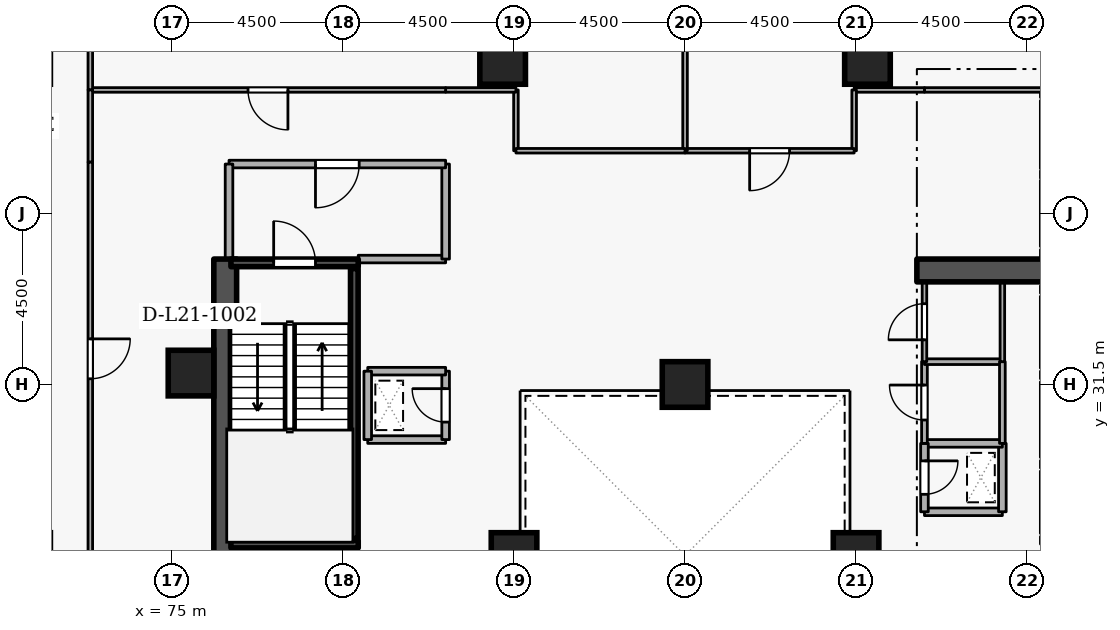
"""IFC4 building model, lengths in metres.
Left out: names, types, materials, properties, quantities, classifications, styles, units other than length and angle.
Written with IfcOpenShell. Run it as: python <this file> out.ifc"""

import sys

from ifc_helpers import new_model, si_unit, direction, frame, frame_2d, origin, origin_2d, place, context, subcontext, project, spatial, rectangle, extrude, element, fill, save


model = new_model("IFC4")
c1 = context("Model", 3, precision=1e-05, world=origin(), true_north=direction((0.0, 1.0)))
c2 = subcontext(c1, "Body", "Model", "MODEL_VIEW")
j1 = project(units=[si_unit("LENGTHUNIT", "METRE"), si_unit("PLANEANGLEUNIT", "RADIAN")], contexts=[c1])
p1 = place(None, origin())
s1 = spatial("IfcSite", under=j1, at=p1, CompositionType="ELEMENT")
p2 = place(p1, origin())
s2 = spatial("IfcBuilding", under=s1, at=p2, CompositionType="ELEMENT")
p3 = place(p2, frame((0.0, 0.0, 83.7)))
s3 = spatial("IfcBuildingStorey", under=s2, at=p3, CompositionType="ELEMENT", Elevation=83.7)
p4 = place(p3, frame((94.6, 34.5, 0.0), z_axis=(0.0, 0.0, 1.0), x_axis=(1.0, 0.0, 0.0)))
e1 = element("IfcWall", 1, at=p4, inside=s3, PredefinedType="SHEAR", context=c2, shape_type="SweptSolid", body=[
    extrude(rectangle(XDim=5.7, YDim=0.6, at=frame_2d((2.85, 0.0))), origin(), (0.0, 0.0, 1.0), 3.6),
])
p5 = place(p3, frame((76.4, 19.2, 0.0), z_axis=(0.0, 0.0, 1.0), x_axis=(0.0, 1.0, 0.0)))
e2 = element("IfcWall", 2, at=p5, inside=s3, PredefinedType="SHEAR", context=c2, shape_type="SweptSolid", body=[
    extrude(rectangle(XDim=15.6, YDim=0.6, at=frame_2d((7.8, 0.0))), origin(), (0.0, 0.0, 1.0), 3.6),
])
for number, where, z_axis, x_axis in (
    (3, (93.3, 40.0, 0.0), (0.0, 0.0, 1.0), (1.0, 0.0, 0.0)),
    (4, (83.7, 40.0, 0.0), (0.0, 0.0, 1.0), (1.0, 0.0, 0.0)),
    (5, (75.5, 31.8, 0.0), (0.0, 0.0, 1.0), (1.0, 0.0, 0.0)),
    (6, (93.0, 27.0, 0.0), (0.0, 0.0, 1.0), (1.0, 0.0, 0.0)),
    (7, (84.0, 27.0, 0.0), (0.0, 0.0, 1.0), (1.0, 0.0, 0.0)),
    (8, (88.5, 31.5, 0.0), (0.0, 0.0, 1.0), (1.0, 0.0, 0.0)),
):
    element("IfcColumn", number, at=place(p3, frame(where, z_axis=z_axis, x_axis=x_axis)), inside=s3, PredefinedType="COLUMN", context=c2, shape_type="SweptSolid", body=[
        extrude(rectangle(XDim=1.2, YDim=1.2, at=origin_2d()), origin(), (0.0, 0.0, 1.0), 3.6),
    ])
p6 = place(p3, frame((97.95, 29.22, 0.0), z_axis=(0.0, 0.0, 1.0), x_axis=(0.0, -1.0, 0.0)))
e9 = element("IfcWall", 9, at=p6, inside=s3, PredefinedType="STANDARD", context=c2, shape_type="SweptSolid", body=[
    extrude(rectangle(XDim=1.64, YDim=0.2, at=frame_2d((0.82, 0.0))), origin(), (0.0, 0.0, 1.0), 3.34),
])
p7 = place(p6, frame((0.31, 0.0, 0.0)))
e10 = element("IfcOpeningElement", 10, at=p7, cuts=e9, PredefinedType="OPENING", context=c2, shape_type="SweptSolid", body=[
    extrude(rectangle(XDim=1.02, YDim=2.06, at=frame_2d((0.51, 1.03))), frame((0.0, 0.11, 0.0), z_axis=(0.0, -1.0, 0.0), x_axis=(1.0, 0.0, 0.0)), (0.0, 0.0, 1.0), 0.22),
])
p8 = place(p3, frame((97.95, 31.57, 0.0), z_axis=(0.0, 0.0, 1.0), x_axis=(0.0, -1.0, 0.0)))
e11 = element("IfcWall", 11, at=p8, inside=s3, PredefinedType="STANDARD", context=c2, shape_type="SweptSolid", body=[
    extrude(rectangle(XDim=1.99, YDim=0.2, at=frame_2d((0.995, 0.0))), origin(), (0.0, 0.0, 1.0), 3.34),
])
p9 = place(p3, frame((97.95, 33.82, 0.0), z_axis=(0.0, 0.0, 1.0), x_axis=(0.0, -1.0, 0.0)))
e12 = element("IfcWall", 12, at=p9, inside=s3, PredefinedType="STANDARD", context=c2, shape_type="SweptSolid", body=[
    extrude(rectangle(XDim=1.89, YDim=0.2, at=frame_2d((0.945, 0.0))), origin(), (0.0, 0.0, 1.0), 3.34),
])
p10 = place(p9, frame((0.435, 0.0, 0.0)))
e13 = element("IfcOpeningElement", 13, at=p10, cuts=e12, PredefinedType="OPENING", context=c2, shape_type="SweptSolid", body=[
    extrude(rectangle(XDim=1.02, YDim=2.06, at=frame_2d((0.51, 1.03))), frame((0.0, 0.11, 0.0), z_axis=(0.0, -1.0, 0.0), x_axis=(1.0, 0.0, 0.0)), (0.0, 0.0, 1.0), 0.22),
])
p11 = place(p3, frame((97.95, 36.87, 0.0), z_axis=(0.0, 0.0, 1.0), x_axis=(0.0, -1.0, 0.0)))
e14 = element("IfcWall", 14, at=p11, inside=s3, PredefinedType="STANDARD", context=c2, shape_type="SweptSolid", body=[
    extrude(rectangle(XDim=1.74, YDim=0.2, at=frame_2d((0.87, 0.0))), origin(), (0.0, 0.0, 1.0), 3.34),
])
p12 = place(p11, frame((0.36, 0.0, 0.0)))
e15 = element("IfcOpeningElement", 15, at=p12, cuts=e14, PredefinedType="OPENING", context=c2, shape_type="SweptSolid", body=[
    extrude(rectangle(XDim=1.02, YDim=2.06, at=frame_2d((0.51, 1.03))), frame((0.0, 0.11, 0.0), z_axis=(0.0, -1.0, 0.0), x_axis=(1.0, 0.0, 0.0)), (0.0, 0.0, 1.0), 0.22),
])
p13 = place(p3, frame((97.95, 38.97, 0.0), z_axis=(0.0, 0.0, 1.0), x_axis=(0.0, -1.0, 0.0)))
e16 = element("IfcWall", 16, at=p13, inside=s3, PredefinedType="STANDARD", context=c2, shape_type="SweptSolid", body=[
    extrude(rectangle(XDim=1.79, YDim=0.2, at=frame_2d((0.895, 0.0))), origin(), (0.0, 0.0, 1.0), 3.34),
])
p14 = place(p13, frame((0.385, 0.0, 0.0)))
e17 = element("IfcOpeningElement", 17, at=p14, cuts=e16, PredefinedType="OPENING", context=c2, shape_type="SweptSolid", body=[
    extrude(rectangle(XDim=1.02, YDim=2.06, at=frame_2d((0.51, 1.03))), frame((0.0, 0.11, 0.0), z_axis=(0.0, -1.0, 0.0), x_axis=(1.0, 0.0, 0.0)), (0.0, 0.0, 1.0), 0.22),
])
p15 = place(p3, frame((76.55, 34.7, 0.0), z_axis=(0.0, 0.0, 1.0), x_axis=(1.0, 0.0, 0.0)))
e18 = element("IfcWall", 18, at=p15, inside=s3, PredefinedType="SHEAR", context=c2, shape_type="SweptSolid", body=[
    extrude(rectangle(XDim=3.35, YDim=0.2, at=frame_2d((1.675, 0.0))), origin(), (0.0, 0.0, 1.0), 3.6),
])
p16 = place(p15, frame((1.125, 0.0, 0.0)))
e19 = element("IfcOpeningElement", 19, at=p16, cuts=e18, PredefinedType="OPENING", context=c2, shape_type="SweptSolid", body=[
    extrude(rectangle(XDim=1.1, YDim=2.1, at=frame_2d((0.55, 1.05))), frame((0.0, 0.11, 0.0), z_axis=(0.0, -1.0, 0.0), x_axis=(1.0, 0.0, 0.0)), (0.0, 0.0, 1.0), 0.22),
])
p17 = place(p3, frame((79.9, 27.3, 0.0), z_axis=(0.0, 0.0, 1.0), x_axis=(-1.0, 0.0, 0.0)))
e20 = element("IfcWall", 20, at=p17, inside=s3, PredefinedType="SHEAR", context=c2, shape_type="SweptSolid", body=[
    extrude(rectangle(XDim=3.35, YDim=0.2, at=frame_2d((1.675, 0.0))), origin(), (0.0, 0.0, 1.0), 3.6),
])
p18 = place(p3, frame((79.797, 27.45, 0.0), z_axis=(0.0, 0.0, 1.0), x_axis=(0.0, 1.0, 0.0)))
e21 = element("IfcWall", 21, at=p18, inside=s3, PredefinedType="SHEAR", context=c2, shape_type="SweptSolid", body=[
    extrude(rectangle(XDim=7.1, YDim=0.2, at=frame_2d((3.55, 0.0))), origin(), (0.0, 0.0, 1.0), 3.6),
])
p19 = place(p3, frame((79.9, 34.8, 0.0), z_axis=(0.0, 0.0, 1.0), x_axis=(1.0, 0.0, 0.0)))
e22 = element("IfcWall", 22, at=p19, inside=s3, PredefinedType="STANDARD", context=c2, shape_type="SweptSolid", body=[
    extrude(rectangle(XDim=2.3, YDim=0.2, at=frame_2d((1.15, 0.0))), origin(), (0.0, 0.0, 1.0), 2.545),
])
p20 = place(p3, frame((82.2, 34.8, 0.0), z_axis=(0.0, 0.0, 1.0), x_axis=(0.0, 1.0, 0.0)))
e23 = element("IfcWall", 23, at=p20, inside=s3, PredefinedType="STANDARD", context=c2, shape_type="SweptSolid", body=[
    extrude(rectangle(XDim=2.5, YDim=0.2, at=frame_2d((1.25, 0.0))), origin(), (0.0, 0.0, 1.0), 3.34),
])
p21 = place(p3, frame((82.2, 37.3, 0.0), z_axis=(0.0, 0.0, 1.0), x_axis=(-1.0, 0.0, 0.0)))
e24 = element("IfcWall", 24, at=p21, inside=s3, PredefinedType="STANDARD", context=c2, shape_type="SweptSolid", body=[
    extrude(rectangle(XDim=5.7, YDim=0.2, at=frame_2d((2.85, 0.0))), origin(), (0.0, 0.0, 1.0), 3.34),
])
p22 = place(p21, frame((2.275, 0.0, 0.0)))
e25 = element("IfcOpeningElement", 25, at=p22, cuts=e24, PredefinedType="OPENING", context=c2, shape_type="SweptSolid", body=[
    extrude(rectangle(XDim=1.15, YDim=2.1, at=frame_2d((0.575, 1.05))), frame((0.0, 0.11, 0.0), z_axis=(0.0, -1.0, 0.0), x_axis=(1.0, 0.0, 0.0)), (0.0, 0.0, 1.0), 0.22),
])
p23 = place(p3, frame((76.5, 37.3, 0.0), z_axis=(0.0, 0.0, 1.0), x_axis=(0.0, -1.0, 0.0)))
e26 = element("IfcWall", 26, at=p23, inside=s3, PredefinedType="STANDARD", context=c2, shape_type="SweptSolid", body=[
    extrude(rectangle(XDim=2.5, YDim=0.2, at=frame_2d((1.25, 0.0))), origin(), (0.0, 0.0, 1.0), 3.34),
])
p24 = place(p3, frame((94.8, 28.15, 0.0), z_axis=(0.0, 0.0, 1.0), x_axis=(1.0, 0.0, 0.0)))
e27 = element("IfcWall", 27, at=p24, inside=s3, PredefinedType="STANDARD", context=c2, shape_type="SweptSolid", body=[
    extrude(rectangle(XDim=2.05, YDim=0.2, at=frame_2d((1.025, 0.0))), origin(), (0.0, 0.0, 1.0), 3.34),
])
p25 = place(p3, frame((96.85, 28.15, 0.0), z_axis=(0.0, 0.0, 1.0), x_axis=(0.0, 1.0, 0.0)))
e28 = element("IfcWall", 28, at=p25, inside=s3, PredefinedType="STANDARD", context=c2, shape_type="SweptSolid", body=[
    extrude(rectangle(XDim=1.8, YDim=0.2, at=frame_2d((0.9, 0.0))), origin(), (0.0, 0.0, 1.0), 3.34),
])
p26 = place(p3, frame((96.85, 29.95, 0.0), z_axis=(0.0, 0.0, 1.0), x_axis=(-1.0, 0.0, 0.0)))
e29 = element("IfcWall", 29, at=p26, inside=s3, PredefinedType="STANDARD", context=c2, shape_type="SweptSolid", body=[
    extrude(rectangle(XDim=2.05, YDim=0.2, at=frame_2d((1.025, 0.0))), origin(), (0.0, 0.0, 1.0), 3.34),
])
p27 = place(p3, frame((94.8, 29.95, 0.0), z_axis=(0.0, 0.0, 1.0), x_axis=(0.0, -1.0, 0.0)))
e30 = element("IfcWall", 30, at=p27, inside=s3, PredefinedType="STANDARD", context=c2, shape_type="SweptSolid", body=[
    extrude(rectangle(XDim=1.8, YDim=0.2, at=frame_2d((0.9, 0.0))), origin(), (0.0, 0.0, 1.0), 3.34),
])
p28 = place(p27, frame((0.46, 0.0, 0.0)))
e31 = element("IfcOpeningElement", 31, at=p28, cuts=e30, PredefinedType="OPENING", context=c2, shape_type="SweptSolid", body=[
    extrude(rectangle(XDim=0.88, YDim=2.04, at=frame_2d((0.44, 1.02))), frame((0.0, 0.11, 0.0), z_axis=(0.0, -1.0, 0.0), x_axis=(1.0, 0.0, 0.0)), (0.0, 0.0, 1.0), 0.22),
])
p29 = place(p3, frame((80.15, 30.05, 0.0), z_axis=(0.0, 0.0, 1.0), x_axis=(1.0, 0.0, 0.0)))
e32 = element("IfcWall", 32, at=p29, inside=s3, PredefinedType="STANDARD", context=c2, shape_type="SweptSolid", body=[
    extrude(rectangle(XDim=2.05, YDim=0.2, at=frame_2d((1.025, 0.0))), origin(), (0.0, 0.0, 1.0), 3.34),
])
p30 = place(p3, frame((82.2, 30.05, 0.0), z_axis=(0.0, 0.0, 1.0), x_axis=(0.0, 1.0, 0.0)))
e33 = element("IfcWall", 33, at=p30, inside=s3, PredefinedType="STANDARD", context=c2, shape_type="SweptSolid", body=[
    extrude(rectangle(XDim=1.8, YDim=0.2, at=frame_2d((0.9, 0.0))), origin(), (0.0, 0.0, 1.0), 3.34),
])
p31 = place(p30, frame((0.46, 0.0, 0.0)))
e34 = element("IfcOpeningElement", 34, at=p31, cuts=e33, PredefinedType="OPENING", context=c2, shape_type="SweptSolid", body=[
    extrude(rectangle(XDim=0.88, YDim=2.04, at=frame_2d((0.44, 1.02))), frame((0.0, 0.11, 0.0), z_axis=(0.0, -1.0, 0.0), x_axis=(1.0, 0.0, 0.0)), (0.0, 0.0, 1.0), 0.22),
])
p32 = place(p3, frame((82.2, 31.85, 0.0), z_axis=(0.0, 0.0, 1.0), x_axis=(-1.0, 0.0, 0.0)))
e35 = element("IfcWall", 35, at=p32, inside=s3, PredefinedType="STANDARD", context=c2, shape_type="SweptSolid", body=[
    extrude(rectangle(XDim=2.05, YDim=0.2, at=frame_2d((1.025, 0.0))), origin(), (0.0, 0.0, 1.0), 3.34),
])
p33 = place(p3, frame((80.15, 31.85, 0.0), z_axis=(0.0, 0.0, 1.0), x_axis=(0.0, -1.0, 0.0)))
e36 = element("IfcWall", 36, at=p33, inside=s3, PredefinedType="STANDARD", context=c2, shape_type="SweptSolid", body=[
    extrude(rectangle(XDim=1.8, YDim=0.2, at=frame_2d((0.9, 0.0))), origin(), (0.0, 0.0, 1.0), 3.34),
])
p34 = place(p3, frame((94.8, 29.95, 0.0), z_axis=(0.0, 0.0, 1.0), x_axis=(0.0, 1.0, 0.0)))
e37 = element("IfcWall", 37, at=p34, inside=s3, PredefinedType="PARTITIONING", context=c2, shape_type="SweptSolid", body=[
    extrude(rectangle(XDim=2.15, YDim=0.15, at=frame_2d((1.075, 0.0))), origin(), (0.0, 0.0, 1.0), 3.34),
])
p35 = place(p34, frame((0.615, 0.0, 0.0)))
e38 = element("IfcOpeningElement", 38, at=p35, cuts=e37, PredefinedType="OPENING", context=c2, shape_type="SweptSolid", body=[
    extrude(rectangle(XDim=0.92, YDim=2.08, at=frame_2d((0.46, 1.04))), frame((0.0, 0.085, 0.0), z_axis=(0.0, -1.0, 0.0), x_axis=(1.0, 0.0, 0.0)), (0.0, 0.0, 1.0), 0.17),
])
p36 = place(p3, frame((94.8, 32.1, 0.0), z_axis=(0.0, 0.0, 1.0), x_axis=(1.0, 0.0, 0.0)))
e39 = element("IfcWall", 39, at=p36, inside=s3, PredefinedType="PARTITIONING", context=c2, shape_type="SweptSolid", body=[
    extrude(rectangle(XDim=2.05, YDim=0.15, at=frame_2d((1.025, 0.0))), origin(), (0.0, 0.0, 1.0), 3.34),
])
p37 = place(p3, frame((96.85, 32.1, 0.0), z_axis=(0.0, 0.0, 1.0), x_axis=(0.0, -1.0, 0.0)))
e40 = element("IfcWall", 40, at=p37, inside=s3, PredefinedType="PARTITIONING", context=c2, shape_type="SweptSolid", body=[
    extrude(rectangle(XDim=2.15, YDim=0.15, at=frame_2d((1.075, 0.0))), origin(), (0.0, 0.0, 1.0), 3.34),
])
p38 = place(p3, frame((94.8, 32.1, 0.0), z_axis=(0.0, 0.0, 1.0), x_axis=(0.0, 1.0, 0.0)))
e41 = element("IfcWall", 41, at=p38, inside=s3, PredefinedType="PARTITIONING", context=c2, shape_type="SweptSolid", body=[
    extrude(rectangle(XDim=2.1, YDim=0.12, at=frame_2d((1.05, 0.0))), origin(), (0.0, 0.0, 1.0), 3.34),
])
p39 = place(p38, frame((0.575, 0.0, 0.0)))
e42 = element("IfcOpeningElement", 42, at=p39, cuts=e41, PredefinedType="OPENING", context=c2, shape_type="SweptSolid", body=[
    extrude(rectangle(XDim=0.95, YDim=2.1, at=frame_2d((0.475, 1.05))), frame((0.0, 0.07, 0.0), z_axis=(0.0, -1.0, 0.0), x_axis=(1.0, 0.0, 0.0)), (0.0, 0.0, 1.0), 0.14),
])
p40 = place(p3, frame((96.85, 34.2, 0.0), z_axis=(0.0, 0.0, 1.0), x_axis=(0.0, -1.0, 0.0)))
e43 = element("IfcWall", 43, at=p40, inside=s3, PredefinedType="PARTITIONING", context=c2, shape_type="SweptSolid", body=[
    extrude(rectangle(XDim=2.1, YDim=0.12, at=frame_2d((1.05, 0.0))), origin(), (0.0, 0.0, 1.0), 3.34),
])
p41 = place(p3, frame((97.95, 39.25, 0.0), z_axis=(0.0, 0.0, 1.0), x_axis=(-1.0, 0.0, 0.0)))
e44 = element("IfcWall", 44, at=p41, inside=s3, PredefinedType="PARTITIONING", context=c2, shape_type="SweptSolid", body=[
    extrude(rectangle(XDim=3.15, YDim=0.12, at=frame_2d((1.575, 0.0))), origin(), (0.0, 0.0, 1.0), 3.34),
])
p42 = place(p3, frame((94.8, 39.25, 0.0), z_axis=(0.0, 0.0, 1.0), x_axis=(-1.0, 0.0, 0.0)))
e45 = element("IfcWall", 45, at=p42, inside=s3, PredefinedType="PARTITIONING", context=c2, shape_type="SweptSolid", body=[
    extrude(rectangle(XDim=1.85, YDim=0.12, at=frame_2d((0.925, 0.0))), origin(), (0.0, 0.0, 1.0), 3.34),
])
p43 = place(p3, frame((92.95, 39.25, 0.0), z_axis=(0.0, 0.0, 1.0), x_axis=(0.0, -1.0, 0.0)))
e46 = element("IfcWall", 46, at=p43, inside=s3, PredefinedType="PARTITIONING", context=c2, shape_type="SweptSolid", body=[
    extrude(rectangle(XDim=1.6, YDim=0.12, at=frame_2d((0.8, 0.0))), origin(), (0.0, 0.0, 1.0), 3.34),
])
p44 = place(p3, frame((92.95, 37.65, 0.0), z_axis=(0.0, 0.0, 1.0), x_axis=(-1.0, 0.0, 0.0)))
e47 = element("IfcWall", 47, at=p44, inside=s3, PredefinedType="PARTITIONING", context=c2, shape_type="SweptSolid", body=[
    extrude(rectangle(XDim=4.45, YDim=0.12, at=frame_2d((2.225, 0.0))), origin(), (0.0, 0.0, 1.0), 3.34),
])
p45 = place(p44, frame((1.7, 0.0, 0.0)))
e48 = element("IfcOpeningElement", 48, at=p45, cuts=e47, PredefinedType="OPENING", context=c2, shape_type="SweptSolid", body=[
    extrude(rectangle(XDim=1.05, YDim=2.1, at=frame_2d((0.525, 1.05))), frame((0.0, 0.07, 0.0), z_axis=(0.0, -1.0, 0.0), x_axis=(1.0, 0.0, 0.0)), (0.0, 0.0, 1.0), 0.14),
])
p46 = place(p3, frame((88.5, 37.65, 0.0), z_axis=(0.0, 0.0, 1.0), x_axis=(0.0, 1.0, 0.0)))
e49 = element("IfcWall", 49, at=p46, inside=s3, PredefinedType="PARTITIONING", context=c2, shape_type="SweptSolid", body=[
    extrude(rectangle(XDim=13.27, YDim=0.12, at=frame_2d((6.635, 0.0))), origin(), (0.0, 0.0, 1.0), 2.882),
])
p47 = place(p3, frame((84.05, 37.65, 0.0), z_axis=(0.0, 0.0, 1.0), x_axis=(0.0, 1.0, 0.0)))
e50 = element("IfcWall", 50, at=p47, inside=s3, PredefinedType="PARTITIONING", context=c2, shape_type="SweptSolid", body=[
    extrude(rectangle(XDim=1.6, YDim=0.12, at=frame_2d((0.8, 0.0))), origin(), (0.0, 0.0, 1.0), 3.34),
])
p48 = place(p3, frame((84.05, 39.25, 0.0), z_axis=(0.0, 0.0, 1.0), x_axis=(-1.0, 0.0, 0.0)))
e51 = element("IfcWall", 51, at=p48, inside=s3, PredefinedType="PARTITIONING", context=c2, shape_type="SweptSolid", body=[
    extrude(rectangle(XDim=1.85, YDim=0.12, at=frame_2d((0.925, 0.0))), origin(), (0.0, 0.0, 1.0), 3.34),
])
p49 = place(p3, frame((82.2, 39.25, 0.0), z_axis=(0.0, 0.0, 1.0), x_axis=(-1.0, 0.0, 0.0)))
e52 = element("IfcWall", 52, at=p49, inside=s3, PredefinedType="PARTITIONING", context=c2, shape_type="SweptSolid", body=[
    extrude(rectangle(XDim=9.35, YDim=0.12, at=frame_2d((4.675, 0.0))), origin(), (0.0, 0.0, 1.0), 3.34),
])
p50 = place(p49, frame((4.15, 0.0, 0.0)))
e53 = element("IfcOpeningElement", 53, at=p50, cuts=e52, PredefinedType="OPENING", context=c2, shape_type="SweptSolid", body=[
    extrude(rectangle(XDim=1.05, YDim=2.1, at=frame_2d((0.525, 1.05))), frame((0.0, 0.07, 0.0), z_axis=(0.0, -1.0, 0.0), x_axis=(1.0, 0.0, 0.0)), (0.0, 0.0, 1.0), 0.14),
])
p51 = place(p3, frame((72.85, 39.25, 0.0), z_axis=(0.0, 0.0, 1.0), x_axis=(0.0, 1.0, 0.0)))
e54 = element("IfcWall", 54, at=p51, inside=s3, PredefinedType="PARTITIONING", context=c2, shape_type="SweptSolid", body=[
    extrude(rectangle(XDim=11.67, YDim=0.12, at=frame_2d((5.835, 0.0))), origin(), (0.0, 0.0, 1.0), 3.34),
])
p52 = place(p3, frame((88.5, 37.65, 0.0), z_axis=(0.0, 0.0, 1.0), x_axis=(-1.0, 0.0, 0.0)))
e55 = element("IfcWall", 55, at=p52, inside=s3, PredefinedType="PARTITIONING", context=c2, shape_type="SweptSolid", body=[
    extrude(rectangle(XDim=4.45, YDim=0.12, at=frame_2d((2.225, 0.0))), origin(), (0.0, 0.0, 1.0), 3.34),
])
p53 = place(p3, frame((72.85, 39.25, 0.0), z_axis=(0.0, 0.0, 1.0), x_axis=(0.0, -1.0, 0.0)))
e56 = element("IfcWall", 56, at=p53, inside=s3, PredefinedType="PARTITIONING", context=c2, shape_type="SweptSolid", body=[
    extrude(rectangle(XDim=1.9, YDim=0.12, at=frame_2d((0.95, 0.0))), origin(), (0.0, 0.0, 1.0), 2.895),
])
p54 = place(p3, frame((72.85, 37.35, 0.0), z_axis=(0.0, 0.0, 1.0), x_axis=(0.0, -1.0, 0.0)))
e57 = element("IfcWall", 57, at=p54, inside=s3, PredefinedType="PARTITIONING", context=c2, shape_type="SweptSolid", body=[
    extrude(rectangle(XDim=10.35, YDim=0.12, at=frame_2d((5.175, 0.0))), origin(), (0.0, 0.0, 1.0), 2.895),
])
p55 = place(p54, frame((4.65, 0.0, 0.0)))
e58 = element("IfcOpeningElement", 58, at=p55, cuts=e57, PredefinedType="OPENING", context=c2, shape_type="SweptSolid", body=[
    extrude(rectangle(XDim=1.05, YDim=2.1, at=frame_2d((0.525, 1.05))), frame((0.0, 0.07, 0.0), z_axis=(0.0, -1.0, 0.0), x_axis=(1.0, 0.0, 0.0)), (0.0, 0.0, 1.0), 0.14),
])
p56 = place(p16, origin())
e59 = element("IfcDoor", 59, at=p56, inside=s3, OperationType="SINGLE_SWING_LEFT", PredefinedType="DOOR", context=c2, shape_type="SweptSolid", body=[
    extrude(rectangle(XDim=1.1, YDim=2.1, at=frame_2d((0.55, 1.05))), frame((0.0, 0.025, 0.0), z_axis=(0.0, -1.0, 0.0), x_axis=(1.0, 0.0, 0.0)), (0.0, 0.0, 1.0), 0.05),
])
fill(e19, e59)
p57 = place(p22, origin())
e60 = element("IfcDoor", 60, at=p57, inside=s3, OperationType="SINGLE_SWING_RIGHT", PredefinedType="DOOR", context=c2, shape_type="SweptSolid", body=[
    extrude(rectangle(XDim=1.15, YDim=2.1, at=frame_2d((0.575, 1.05))), frame((0.0, 0.025, 0.0), z_axis=(0.0, -1.0, 0.0), x_axis=(1.0, 0.0, 0.0)), (0.0, 0.0, 1.0), 0.05),
])
fill(e25, e60)
p58 = place(p28, origin())
e61 = element("IfcDoor", 61, at=p58, inside=s3, OperationType="SINGLE_SWING_LEFT", PredefinedType="DOOR", context=c2, shape_type="SweptSolid", body=[
    extrude(rectangle(XDim=0.88, YDim=2.04, at=frame_2d((0.44, 1.02))), frame((0.0, 0.025, 0.0), z_axis=(0.0, -1.0, 0.0), x_axis=(1.0, 0.0, 0.0)), (0.0, 0.0, 1.0), 0.05),
])
fill(e31, e61)
p59 = place(p31, origin())
e62 = element("IfcDoor", 62, at=p59, inside=s3, OperationType="SINGLE_SWING_RIGHT", PredefinedType="DOOR", context=c2, shape_type="SweptSolid", body=[
    extrude(rectangle(XDim=0.88, YDim=2.04, at=frame_2d((0.44, 1.02))), frame((0.0, 0.025, 0.0), z_axis=(0.0, -1.0, 0.0), x_axis=(1.0, 0.0, 0.0)), (0.0, 0.0, 1.0), 0.05),
])
fill(e34, e62)
p60 = place(p35, origin())
e63 = element("IfcDoor", 63, at=p60, inside=s3, OperationType="SINGLE_SWING_RIGHT", PredefinedType="DOOR", context=c2, shape_type="SweptSolid", body=[
    extrude(rectangle(XDim=0.92, YDim=2.08, at=frame_2d((0.46, 1.04))), frame((0.0, 0.025, 0.0), z_axis=(0.0, -1.0, 0.0), x_axis=(1.0, 0.0, 0.0)), (0.0, 0.0, 1.0), 0.05),
])
fill(e38, e63)
p61 = place(p39, origin())
e64 = element("IfcDoor", 64, at=p61, inside=s3, OperationType="SINGLE_SWING_LEFT", PredefinedType="DOOR", context=c2, shape_type="SweptSolid", body=[
    extrude(rectangle(XDim=0.95, YDim=2.1, at=frame_2d((0.475, 1.05))), frame((0.0, 0.025, 0.0), z_axis=(0.0, -1.0, 0.0), x_axis=(1.0, 0.0, 0.0)), (0.0, 0.0, 1.0), 0.05),
])
fill(e42, e64)
p62 = place(p45, origin())
e65 = element("IfcDoor", 65, at=p62, inside=s3, OperationType="SINGLE_SWING_RIGHT", PredefinedType="DOOR", context=c2, shape_type="SweptSolid", body=[
    extrude(rectangle(XDim=1.05, YDim=2.1, at=frame_2d((0.525, 1.05))), frame((0.0, 0.025, 0.0), z_axis=(0.0, -1.0, 0.0), x_axis=(1.0, 0.0, 0.0)), (0.0, 0.0, 1.0), 0.05),
])
fill(e48, e65)
p63 = place(p50, origin())
e66 = element("IfcDoor", 66, at=p63, inside=s3, OperationType="SINGLE_SWING_LEFT", PredefinedType="DOOR", context=c2, shape_type="SweptSolid", body=[
    extrude(rectangle(XDim=1.05, YDim=2.1, at=frame_2d((0.525, 1.05))), frame((0.0, 0.025, 0.0), z_axis=(0.0, -1.0, 0.0), x_axis=(1.0, 0.0, 0.0)), (0.0, 0.0, 1.0), 0.05),
])
fill(e53, e66)
p64 = place(p55, origin())
e67 = element("IfcDoor", 67, at=p64, inside=s3, OperationType="SINGLE_SWING_LEFT", PredefinedType="DOOR", context=c2, shape_type="SweptSolid", body=[
    extrude(rectangle(XDim=1.05, YDim=2.1, at=frame_2d((0.525, 1.05))), frame((0.0, 0.025, 0.0), z_axis=(0.0, -1.0, 0.0), x_axis=(1.0, 0.0, 0.0)), (0.0, 0.0, 1.0), 0.05),
])
fill(e58, e67)
save(model, sys.argv[1])
